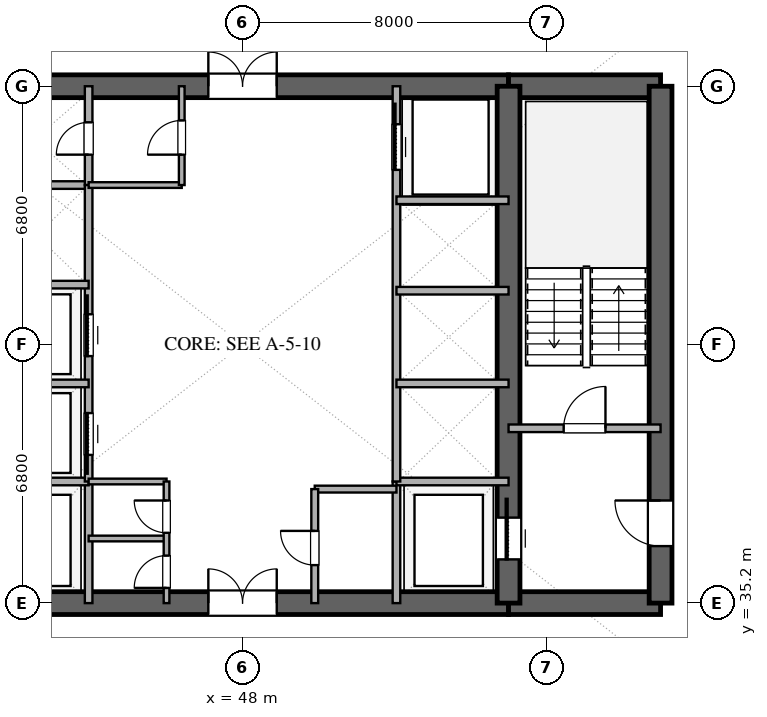
"""IFC4 building model, lengths in metres.
Left out: names, types, materials, properties, quantities, classifications, styles, units other than length and angle.
Written with IfcOpenShell. Run it as: python <this file> out.ifc"""

import sys

from ifc_helpers import new_model, si_unit, direction, frame, frame_2d, origin, place, context, subcontext, project, spatial, rectangle, extrude, element, fill, save


model = new_model("IFC4")
c1 = context("Model", 3, precision=1e-05, world=origin(), true_north=direction((0.0, 1.0)))
c2 = subcontext(c1, "Body", "Model", "MODEL_VIEW")
j1 = project(units=[si_unit("LENGTHUNIT", "METRE"), si_unit("PLANEANGLEUNIT", "RADIAN")], contexts=[c1])
p1 = place(None, origin())
s1 = spatial("IfcSite", under=j1, at=p1, CompositionType="ELEMENT")
p2 = place(p1, origin())
s2 = spatial("IfcBuilding", under=s1, at=p2, CompositionType="ELEMENT")
p3 = place(p2, frame((0.0, 0.0, 39.0)))
s3 = spatial("IfcBuildingStorey", under=s2, at=p3, CompositionType="ELEMENT", Elevation=39.0)
p4 = place(p3, frame((41.0, 35.2, 0.0), z_axis=(0.0, 0.0, 1.0), x_axis=(1.0, 0.0, 0.0)))
e1 = element("IfcWall", 1, at=p4, inside=s3, PredefinedType="SHEAR", context=c2, shape_type="SweptSolid", body=[
    extrude(rectangle(XDim=14.0, YDim=0.6, at=frame_2d((7.0, 0.0))), origin(), (0.0, 0.0, 1.0), 3.38),
])
p5 = place(p4, frame((6.1, 0.0, 0.0)))
e2 = element("IfcOpeningElement", 2, at=p5, cuts=e1, PredefinedType="OPENING", context=c2, shape_type="SweptSolid", body=[
    extrude(rectangle(XDim=1.8, YDim=2.25, at=frame_2d((0.9, 1.125))), frame((0.0, 0.31, 0.0), z_axis=(0.0, -1.0, 0.0), x_axis=(1.0, 0.0, 0.0)), (0.0, 0.0, 1.0), 0.62),
])
p6 = place(p3, frame((55.0, 35.2, 0.0), z_axis=(0.0, 0.0, 1.0), x_axis=(1.0, 0.0, 0.0)))
e3 = element("IfcWall", 3, at=p6, inside=s3, PredefinedType="SHEAR", context=c2, shape_type="SweptSolid", body=[
    extrude(rectangle(XDim=4.0, YDim=0.6, at=frame_2d((2.0, 0.0))), origin(), (0.0, 0.0, 1.0), 3.38),
])
p7 = place(p3, frame((41.0, 48.8, 0.0), z_axis=(0.0, 0.0, 1.0), x_axis=(1.0, 0.0, 0.0)))
e4 = element("IfcWall", 4, at=p7, inside=s3, PredefinedType="SHEAR", context=c2, shape_type="SweptSolid", body=[
    extrude(rectangle(XDim=14.0, YDim=0.6, at=frame_2d((7.0, 0.0))), origin(), (0.0, 0.0, 1.0), 3.38),
])
p8 = place(p7, frame((6.1, 0.0, 0.0)))
e5 = element("IfcOpeningElement", 5, at=p8, cuts=e4, PredefinedType="OPENING", context=c2, shape_type="SweptSolid", body=[
    extrude(rectangle(XDim=1.8, YDim=2.25, at=frame_2d((0.9, 1.125))), frame((0.0, 0.31, 0.0), z_axis=(0.0, -1.0, 0.0), x_axis=(1.0, 0.0, 0.0)), (0.0, 0.0, 1.0), 0.62),
])
p9 = place(p3, frame((55.0, 48.8, 0.0), z_axis=(0.0, 0.0, 1.0), x_axis=(1.0, 0.0, 0.0)))
e6 = element("IfcWall", 6, at=p9, inside=s3, PredefinedType="SHEAR", context=c2, shape_type="SweptSolid", body=[
    extrude(rectangle(XDim=4.0, YDim=0.6, at=frame_2d((2.0, 0.0))), origin(), (0.0, 0.0, 1.0), 3.38),
])
p10 = place(p3, frame((59.0, 35.2, 0.0), z_axis=(0.0, 0.0, 1.0), x_axis=(0.0, 1.0, 0.0)))
e7 = element("IfcWall", 7, at=p10, inside=s3, PredefinedType="SHEAR", context=c2, shape_type="SweptSolid", body=[
    extrude(rectangle(XDim=13.6, YDim=0.6, at=frame_2d((6.8, 0.0))), origin(), (0.0, 0.0, 1.0), 3.38),
])
p11 = place(p10, frame((1.5, 0.0, 0.0)))
e8 = element("IfcOpeningElement", 8, at=p11, cuts=e7, PredefinedType="OPENING", context=c2, shape_type="SweptSolid", body=[
    extrude(rectangle(XDim=1.2, YDim=2.15, at=frame_2d((0.6, 1.075))), frame((0.0, 0.31, 0.0), z_axis=(0.0, -1.0, 0.0), x_axis=(1.0, 0.0, 0.0)), (0.0, 0.0, 1.0), 0.62),
])
p12 = place(p3, frame((55.0, 35.2, 0.0), z_axis=(0.0, 0.0, 1.0), x_axis=(0.0, 1.0, 0.0)))
e9 = element("IfcWall", 9, at=p12, inside=s3, PredefinedType="SHEAR", context=c2, shape_type="SweptSolid", body=[
    extrude(rectangle(XDim=13.6, YDim=0.6, at=frame_2d((6.8, 0.0))), origin(), (0.0, 0.0, 1.0), 3.38),
])
p13 = place(p12, frame((1.15, 0.0, 0.0)))
e10 = element("IfcOpeningElement", 10, at=p13, cuts=e9, PredefinedType="OPENING", context=c2, shape_type="SweptSolid", body=[
    extrude(rectangle(XDim=1.1, YDim=2.2, at=frame_2d((0.55, 1.1))), frame((0.0, 0.31, 0.0), z_axis=(0.0, -1.0, 0.0), x_axis=(1.0, 0.0, 0.0)), (0.0, 0.0, 1.0), 0.62),
])
p14 = place(p3, frame((55.0, 39.8, 0.0), z_axis=(0.0, 0.0, 1.0), x_axis=(1.0, 0.0, 0.0)))
e11 = element("IfcWall", 11, at=p14, inside=s3, PredefinedType="SOLIDWALL", context=c2, shape_type="SweptSolid", body=[
    extrude(rectangle(XDim=4.0, YDim=0.2, at=frame_2d((2.0, 0.0))), origin(), (0.0, 0.0, 1.0), 2.74),
])
p15 = place(p14, frame((1.45, 0.0, 0.0)))
e12 = element("IfcOpeningElement", 12, at=p15, cuts=e11, PredefinedType="OPENING", context=c2, shape_type="SweptSolid", body=[
    extrude(rectangle(XDim=1.1, YDim=2.15, at=frame_2d((0.55, 1.075))), frame((0.0, 0.11, 0.0), z_axis=(0.0, -1.0, 0.0), x_axis=(1.0, 0.0, 0.0)), (0.0, 0.0, 1.0), 0.22),
])
p16 = place(p3, frame((43.95, 35.2, 0.0), z_axis=(0.0, 0.0, 1.0), x_axis=(0.0, 1.0, 0.0)))
e13 = element("IfcWall", 13, at=p16, inside=s3, PredefinedType="SOLIDWALL", context=c2, shape_type="SweptSolid", body=[
    extrude(rectangle(XDim=3.2, YDim=0.2, at=frame_2d((1.6, 0.0))), origin(), (0.0, 0.0, 1.0), 2.74),
])
p17 = place(p3, frame((41.0, 38.4, 0.0), z_axis=(0.0, 0.0, 1.0), x_axis=(1.0, 0.0, 0.0)))
e14 = element("IfcWall", 14, at=p17, inside=s3, PredefinedType="SOLIDWALL", context=c2, shape_type="SweptSolid", body=[
    extrude(rectangle(XDim=2.95, YDim=0.2, at=frame_2d((1.475, 0.0))), origin(), (0.0, 0.0, 1.0), 2.74),
])
p18 = place(p3, frame((52.05, 35.2, 0.0), z_axis=(0.0, 0.0, 1.0), x_axis=(0.0, 1.0, 0.0)))
e15 = element("IfcWall", 15, at=p18, inside=s3, PredefinedType="SOLIDWALL", context=c2, shape_type="SweptSolid", body=[
    extrude(rectangle(XDim=3.2, YDim=0.2, at=frame_2d((1.6, 0.0))), origin(), (0.0, 0.0, 1.0), 2.74),
])
for number, where, z_axis, x_axis in (
    (16, (52.05, 38.4, 0.0), (0.0, 0.0, 1.0), (1.0, 0.0, 0.0)),
    (17, (41.0, 46.2, 0.0), (0.0, 0.0, 1.0), (1.0, 0.0, 0.0)),
):
    element("IfcWall", number, at=place(p3, frame(where, z_axis=z_axis, x_axis=x_axis)), inside=s3, PredefinedType="SOLIDWALL", context=c2, shape_type="SweptSolid", body=[
        extrude(rectangle(XDim=2.95, YDim=0.2, at=frame_2d((1.475, 0.0))), origin(), (0.0, 0.0, 1.0), 2.74),
    ])
p19 = place(p3, frame((43.95, 46.2, 0.0), z_axis=(0.0, 0.0, 1.0), x_axis=(0.0, 1.0, 0.0)))
e18 = element("IfcWall", 18, at=p19, inside=s3, PredefinedType="SOLIDWALL", context=c2, shape_type="SweptSolid", body=[
    extrude(rectangle(XDim=2.6, YDim=0.2, at=frame_2d((1.3, 0.0))), origin(), (0.0, 0.0, 1.0), 2.74),
])
p20 = place(p19, frame((0.8, 0.0, 0.0)))
e19 = element("IfcOpeningElement", 19, at=p20, cuts=e18, PredefinedType="OPENING", context=c2, shape_type="SweptSolid", body=[
    extrude(rectangle(XDim=0.85, YDim=2.15, at=frame_2d((0.425, 1.075))), frame((0.0, 0.11, 0.0), z_axis=(0.0, -1.0, 0.0), x_axis=(1.0, 0.0, 0.0)), (0.0, 0.0, 1.0), 0.22),
])
p21 = place(p3, frame((43.95, 38.4, 0.0), z_axis=(0.0, 0.0, 1.0), x_axis=(0.0, 1.0, 0.0)))
e20 = element("IfcWall", 20, at=p21, inside=s3, PredefinedType="SOLIDWALL", context=c2, shape_type="SweptSolid", body=[
    extrude(rectangle(XDim=7.8, YDim=0.2, at=frame_2d((3.9, 0.0))), origin(), (0.0, 0.0, 1.0), 2.74),
])
p22 = place(p21, frame((0.7, 0.0, 0.0)))
e21 = element("IfcOpeningElement", 21, at=p22, cuts=e20, PredefinedType="OPENING", context=c2, shape_type="SweptSolid", body=[
    extrude(rectangle(XDim=1.1, YDim=2.2, at=frame_2d((0.55, 1.1))), frame((0.0, 0.11, 0.0), z_axis=(0.0, -1.0, 0.0), x_axis=(1.0, 0.0, 0.0)), (0.0, 0.0, 1.0), 0.22),
])
p23 = place(p21, frame((3.3, 0.0, 0.0)))
e22 = element("IfcOpeningElement", 22, at=p23, cuts=e20, PredefinedType="OPENING", context=c2, shape_type="SweptSolid", body=[
    extrude(rectangle(XDim=1.1, YDim=2.2, at=frame_2d((0.55, 1.1))), frame((0.0, 0.11, 0.0), z_axis=(0.0, -1.0, 0.0), x_axis=(1.0, 0.0, 0.0)), (0.0, 0.0, 1.0), 0.22),
])
for number, where, z_axis, x_axis in (
    (23, (41.0, 40.98, 0.0), (0.0, 0.0, 1.0), (1.0, 0.0, 0.0)),
    (24, (41.0, 43.58, 0.0), (0.0, 0.0, 1.0), (1.0, 0.0, 0.0)),
):
    element("IfcWall", number, at=place(p3, frame(where, z_axis=z_axis, x_axis=x_axis)), inside=s3, PredefinedType="SOLIDWALL", context=c2, shape_type="SweptSolid", body=[
        extrude(rectangle(XDim=2.95, YDim=0.2, at=frame_2d((1.475, 0.0))), origin(), (0.0, 0.0, 1.0), 2.74),
    ])
p24 = place(p3, frame((52.05, 38.4, 0.0), z_axis=(0.0, 0.0, 1.0), x_axis=(0.0, 1.0, 0.0)))
e25 = element("IfcWall", 25, at=p24, inside=s3, PredefinedType="SOLIDWALL", context=c2, shape_type="SweptSolid", body=[
    extrude(rectangle(XDim=10.4, YDim=0.2, at=frame_2d((5.2, 0.0))), origin(), (0.0, 0.0, 1.0), 2.74),
])
p25 = place(p24, frame((8.2, 0.0, 0.0)))
e26 = element("IfcOpeningElement", 26, at=p25, cuts=e25, PredefinedType="OPENING", context=c2, shape_type="SweptSolid", body=[
    extrude(rectangle(XDim=1.2, YDim=2.2, at=frame_2d((0.6, 1.1))), frame((0.0, 0.11, 0.0), z_axis=(0.0, -1.0, 0.0), x_axis=(1.0, 0.0, 0.0)), (0.0, 0.0, 1.0), 0.22),
])
for number, where, z_axis, x_axis in (
    (27, (52.05, 40.98, 0.0), (0.0, 0.0, 1.0), (1.0, 0.0, 0.0)),
    (28, (52.05, 43.42, 0.0), (0.0, 0.0, 1.0), (1.0, 0.0, 0.0)),
    (29, (52.05, 45.8, 0.0), (0.0, 0.0, 1.0), (1.0, 0.0, 0.0)),
):
    element("IfcWall", number, at=place(p3, frame(where, z_axis=z_axis, x_axis=x_axis)), inside=s3, PredefinedType="SOLIDWALL", context=c2, shape_type="SweptSolid", body=[
        extrude(rectangle(XDim=2.95, YDim=0.2, at=frame_2d((1.475, 0.0))), origin(), (0.0, 0.0, 1.0), 2.74),
    ])
for number, where, z_axis, x_axis in (
    (30, (43.95, 36.9, 0.0), (0.0, 0.0, 1.0), (1.0, 0.0, 0.0)),
    (31, (43.95, 38.4, 0.0), (0.0, 0.0, 1.0), (1.0, 0.0, 0.0)),
):
    element("IfcWall", number, at=place(p3, frame(where, z_axis=z_axis, x_axis=x_axis)), inside=s3, PredefinedType="PARTITIONING", context=c2, shape_type="SweptSolid", body=[
        extrude(rectangle(XDim=2.05, YDim=0.15, at=frame_2d((1.025, 0.0))), origin(), (0.0, 0.0, 1.0), 2.74),
    ])
p26 = place(p3, frame((46.0, 35.2, 0.0), z_axis=(0.0, 0.0, 1.0), x_axis=(0.0, 1.0, 0.0)))
e32 = element("IfcWall", 32, at=p26, inside=s3, PredefinedType="PARTITIONING", context=c2, shape_type="SweptSolid", body=[
    extrude(rectangle(XDim=3.2, YDim=0.15, at=frame_2d((1.6, 0.0))), origin(), (0.0, 0.0, 1.0), 2.74),
])
p27 = place(p26, frame((0.4, 0.0, 0.0)))
e33 = element("IfcOpeningElement", 33, at=p27, cuts=e32, PredefinedType="OPENING", context=c2, shape_type="SweptSolid", body=[
    extrude(rectangle(XDim=0.85, YDim=2.15, at=frame_2d((0.425, 1.075))), frame((0.0, 0.085, 0.0), z_axis=(0.0, -1.0, 0.0), x_axis=(1.0, 0.0, 0.0)), (0.0, 0.0, 1.0), 0.17),
])
p28 = place(p26, frame((1.85, 0.0, 0.0)))
e34 = element("IfcOpeningElement", 34, at=p28, cuts=e32, PredefinedType="OPENING", context=c2, shape_type="SweptSolid", body=[
    extrude(rectangle(XDim=0.85, YDim=2.15, at=frame_2d((0.425, 1.075))), frame((0.0, 0.085, 0.0), z_axis=(0.0, -1.0, 0.0), x_axis=(1.0, 0.0, 0.0)), (0.0, 0.0, 1.0), 0.17),
])
p29 = place(p3, frame((43.95, 46.2, 0.0), z_axis=(0.0, 0.0, 1.0), x_axis=(1.0, 0.0, 0.0)))
e35 = element("IfcWall", 35, at=p29, inside=s3, PredefinedType="PARTITIONING", context=c2, shape_type="SweptSolid", body=[
    extrude(rectangle(XDim=2.45, YDim=0.15, at=frame_2d((1.225, 0.0))), origin(), (0.0, 0.0, 1.0), 2.74),
])
p30 = place(p3, frame((46.4, 46.2, 0.0), z_axis=(0.0, 0.0, 1.0), x_axis=(0.0, 1.0, 0.0)))
e36 = element("IfcWall", 36, at=p30, inside=s3, PredefinedType="PARTITIONING", context=c2, shape_type="SweptSolid", body=[
    extrude(rectangle(XDim=2.6, YDim=0.15, at=frame_2d((1.3, 0.0))), origin(), (0.0, 0.0, 1.0), 2.74),
])
p31 = place(p30, frame((0.8, 0.0, 0.0)))
e37 = element("IfcOpeningElement", 37, at=p31, cuts=e36, PredefinedType="OPENING", context=c2, shape_type="SweptSolid", body=[
    extrude(rectangle(XDim=0.9, YDim=2.15, at=frame_2d((0.45, 1.075))), frame((0.0, 0.085, 0.0), z_axis=(0.0, -1.0, 0.0), x_axis=(1.0, 0.0, 0.0)), (0.0, 0.0, 1.0), 0.17),
])
p32 = place(p3, frame((49.9, 38.2, 0.0), z_axis=(0.0, 0.0, 1.0), x_axis=(1.0, 0.0, 0.0)))
e38 = element("IfcWall", 38, at=p32, inside=s3, PredefinedType="PLUMBINGWALL", context=c2, shape_type="SweptSolid", body=[
    extrude(rectangle(XDim=2.15, YDim=0.18, at=frame_2d((1.075, 0.0))), origin(), (0.0, 0.0, 1.0), 2.74),
])
p33 = place(p3, frame((49.9, 35.2, 0.0), z_axis=(0.0, 0.0, 1.0), x_axis=(0.0, 1.0, 0.0)))
e39 = element("IfcWall", 39, at=p33, inside=s3, PredefinedType="PLUMBINGWALL", context=c2, shape_type="SweptSolid", body=[
    extrude(rectangle(XDim=3.0, YDim=0.18, at=frame_2d((1.5, 0.0))), origin(), (0.0, 0.0, 1.0), 2.74),
])
p34 = place(p33, frame((1.0, 0.0, 0.0)))
e40 = element("IfcOpeningElement", 40, at=p34, cuts=e39, PredefinedType="OPENING", context=c2, shape_type="SweptSolid", body=[
    extrude(rectangle(XDim=0.9, YDim=2.1, at=frame_2d((0.45, 1.05))), frame((0.0, 0.1, 0.0), z_axis=(0.0, -1.0, 0.0), x_axis=(1.0, 0.0, 0.0)), (0.0, 0.0, 1.0), 0.2),
])
p35 = place(p13, origin())
e41 = element("IfcDoor", 41, at=p35, inside=s3, OperationType="SLIDING_TO_RIGHT", PredefinedType="DOOR", context=c2, shape_type="SweptSolid", body=[
    extrude(rectangle(XDim=1.1, YDim=2.2, at=frame_2d((0.55, 1.1))), frame((0.0, 0.025, 0.0), z_axis=(0.0, -1.0, 0.0), x_axis=(1.0, 0.0, 0.0)), (0.0, 0.0, 1.0), 0.05),
])
fill(e10, e41)
p36 = place(p11, origin())
e42 = element("IfcDoor", 42, at=p36, inside=s3, OperationType="SINGLE_SWING_RIGHT", PredefinedType="DOOR", context=c2, shape_type="SweptSolid", body=[
    extrude(rectangle(XDim=1.2, YDim=2.15, at=frame_2d((0.6, 1.075))), frame((0.0, 0.025, 0.0), z_axis=(0.0, -1.0, 0.0), x_axis=(1.0, 0.0, 0.0)), (0.0, 0.0, 1.0), 0.05),
])
fill(e8, e42)
p37 = place(p5, origin())
e43 = element("IfcDoor", 43, at=p37, inside=s3, OperationType="DOUBLE_DOOR_SINGLE_SWING", PredefinedType="DOOR", context=c2, shape_type="SweptSolid", body=[
    extrude(rectangle(XDim=1.8, YDim=2.25, at=frame_2d((0.9, 1.125))), frame((0.0, 0.025, 0.0), z_axis=(0.0, -1.0, 0.0), x_axis=(1.0, 0.0, 0.0)), (0.0, 0.0, 1.0), 0.05),
])
fill(e2, e43)
p38 = place(p8, origin())
e44 = element("IfcDoor", 44, at=p38, inside=s3, OperationType="DOUBLE_DOOR_SINGLE_SWING", PredefinedType="DOOR", context=c2, shape_type="SweptSolid", body=[
    extrude(rectangle(XDim=1.8, YDim=2.25, at=frame_2d((0.9, 1.125))), frame((0.0, 0.025, 0.0), z_axis=(0.0, -1.0, 0.0), x_axis=(1.0, 0.0, 0.0)), (0.0, 0.0, 1.0), 0.05),
])
fill(e5, e44)
p39 = place(p15, origin())
e45 = element("IfcDoor", 45, at=p39, inside=s3, OperationType="SINGLE_SWING_RIGHT", PredefinedType="DOOR", context=c2, shape_type="SweptSolid", body=[
    extrude(rectangle(XDim=1.1, YDim=2.15, at=frame_2d((0.55, 1.075))), frame((0.0, 0.025, 0.0), z_axis=(0.0, -1.0, 0.0), x_axis=(1.0, 0.0, 0.0)), (0.0, 0.0, 1.0), 0.05),
])
fill(e12, e45)
p40 = place(p20, origin())
e46 = element("IfcDoor", 46, at=p40, inside=s3, OperationType="SINGLE_SWING_LEFT", PredefinedType="DOOR", context=c2, shape_type="SweptSolid", body=[
    extrude(rectangle(XDim=0.85, YDim=2.15, at=frame_2d((0.425, 1.075))), frame((0.0, 0.025, 0.0), z_axis=(0.0, -1.0, 0.0), x_axis=(1.0, 0.0, 0.0)), (0.0, 0.0, 1.0), 0.05),
])
fill(e19, e46)
p41 = place(p22, origin())
e47 = element("IfcDoor", 47, at=p41, inside=s3, OperationType="SLIDING_TO_LEFT", PredefinedType="DOOR", context=c2, shape_type="SweptSolid", body=[
    extrude(rectangle(XDim=1.1, YDim=2.2, at=frame_2d((0.55, 1.1))), frame((0.0, 0.025, 0.0), z_axis=(0.0, -1.0, 0.0), x_axis=(1.0, 0.0, 0.0)), (0.0, 0.0, 1.0), 0.05),
])
fill(e21, e47)
p42 = place(p23, origin())
e48 = element("IfcDoor", 48, at=p42, inside=s3, OperationType="SLIDING_TO_RIGHT", PredefinedType="DOOR", context=c2, shape_type="SweptSolid", body=[
    extrude(rectangle(XDim=1.1, YDim=2.2, at=frame_2d((0.55, 1.1))), frame((0.0, 0.025, 0.0), z_axis=(0.0, -1.0, 0.0), x_axis=(1.0, 0.0, 0.0)), (0.0, 0.0, 1.0), 0.05),
])
fill(e22, e48)
p43 = place(p25, origin())
e49 = element("IfcDoor", 49, at=p43, inside=s3, OperationType="SLIDING_TO_RIGHT", PredefinedType="DOOR", context=c2, shape_type="SweptSolid", body=[
    extrude(rectangle(XDim=1.2, YDim=2.2, at=frame_2d((0.6, 1.1))), frame((0.0, 0.025, 0.0), z_axis=(0.0, -1.0, 0.0), x_axis=(1.0, 0.0, 0.0)), (0.0, 0.0, 1.0), 0.05),
])
fill(e26, e49)
p44 = place(p27, origin())
e50 = element("IfcDoor", 50, at=p44, inside=s3, OperationType="SINGLE_SWING_LEFT", PredefinedType="DOOR", context=c2, shape_type="SweptSolid", body=[
    extrude(rectangle(XDim=0.85, YDim=2.15, at=frame_2d((0.425, 1.075))), frame((0.0, 0.025, 0.0), z_axis=(0.0, -1.0, 0.0), x_axis=(1.0, 0.0, 0.0)), (0.0, 0.0, 1.0), 0.05),
])
fill(e33, e50)
p45 = place(p28, origin())
e51 = element("IfcDoor", 51, at=p45, inside=s3, OperationType="SINGLE_SWING_RIGHT", PredefinedType="DOOR", context=c2, shape_type="SweptSolid", body=[
    extrude(rectangle(XDim=0.85, YDim=2.15, at=frame_2d((0.425, 1.075))), frame((0.0, 0.025, 0.0), z_axis=(0.0, -1.0, 0.0), x_axis=(1.0, 0.0, 0.0)), (0.0, 0.0, 1.0), 0.05),
])
fill(e34, e51)
p46 = place(p31, origin())
e52 = element("IfcDoor", 52, at=p46, inside=s3, OperationType="SINGLE_SWING_LEFT", PredefinedType="DOOR", context=c2, shape_type="SweptSolid", body=[
    extrude(rectangle(XDim=0.9, YDim=2.15, at=frame_2d((0.45, 1.075))), frame((0.0, 0.025, 0.0), z_axis=(0.0, -1.0, 0.0), x_axis=(1.0, 0.0, 0.0)), (0.0, 0.0, 1.0), 0.05),
])
fill(e37, e52)
p47 = place(p34, origin())
e53 = element("IfcDoor", 53, at=p47, inside=s3, OperationType="SINGLE_SWING_RIGHT", PredefinedType="DOOR", context=c2, shape_type="SweptSolid", body=[
    extrude(rectangle(XDim=0.9, YDim=2.1, at=frame_2d((0.45, 1.05))), frame((0.0, 0.025, 0.0), z_axis=(0.0, -1.0, 0.0), x_axis=(1.0, 0.0, 0.0)), (0.0, 0.0, 1.0), 0.05),
])
fill(e40, e53)
save(model, sys.argv[1])
